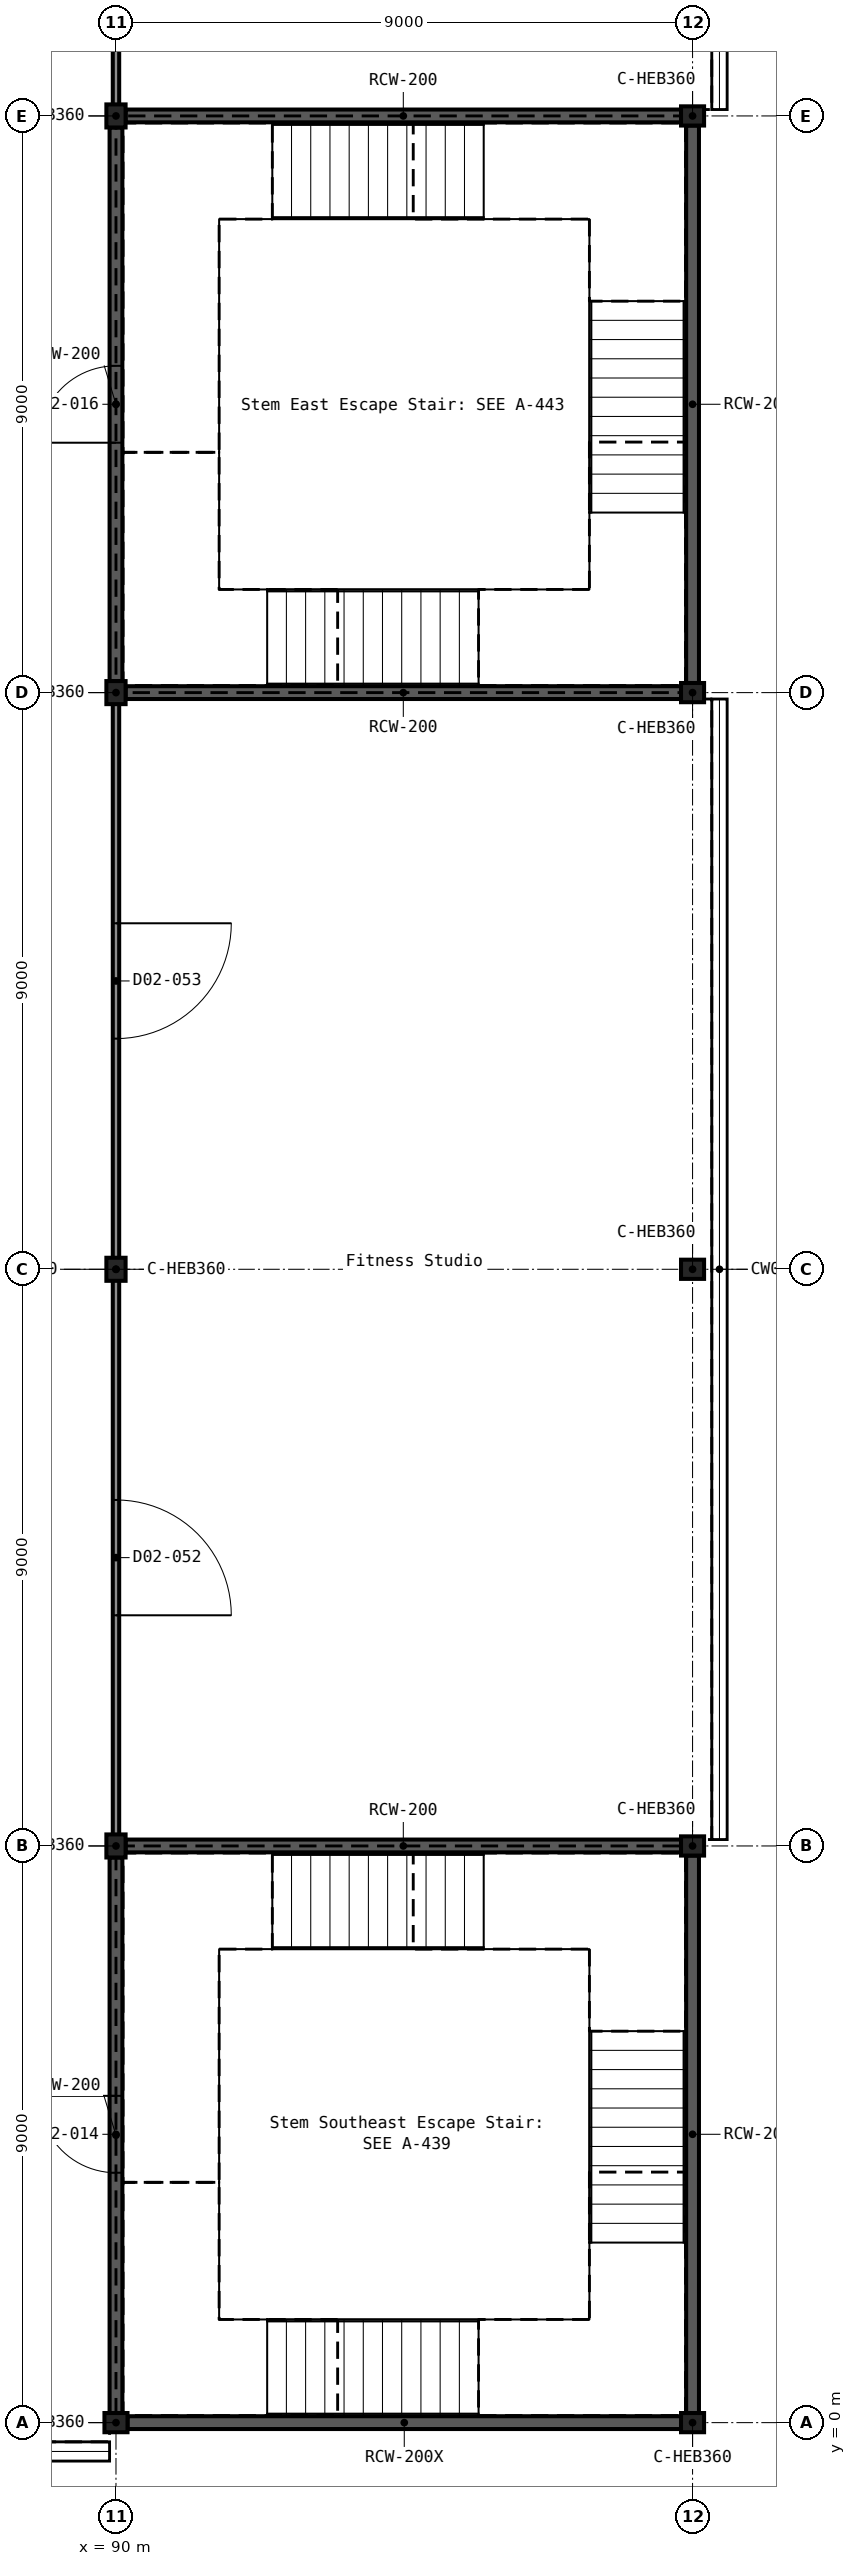
"""IFC4 building model, lengths in metres.
Left out: names, types, materials, properties, quantities, classifications, styles, units other than length and angle.
Written with IfcOpenShell. Run it as: python <this file> out.ifc"""

import sys

from ifc_helpers import new_model, si_unit, direction, frame, frame_2d, origin, origin_2d, place, context, subcontext, project, spatial, rectangle, i_section, extrude, element, fill, save


model = new_model("IFC4")
c1 = context("Model", 3, precision=1e-05, world=origin(), true_north=direction((0.0, 1.0)))
c2 = subcontext(c1, "Body", "Model", "MODEL_VIEW")
j1 = project(units=[si_unit("LENGTHUNIT", "METRE"), si_unit("PLANEANGLEUNIT", "RADIAN")], contexts=[c1])
p1 = place(None, origin())
s1 = spatial("IfcSite", under=j1, at=p1, CompositionType="ELEMENT")
p2 = place(p1, origin())
s2 = spatial("IfcBuilding", under=s1, at=p2, CompositionType="ELEMENT")
p3 = place(p2, frame((0.0, 0.0, 10.8)))
s3 = spatial("IfcBuildingStorey", under=s2, at=p3, CompositionType="ELEMENT", Elevation=10.8)
for number, where, z_axis, x_axis in (
    (1, (90.0, 0.0, 0.0), (0.0, 0.0, 1.0), (0.0, 1.0, 0.0)),
    (2, (99.0, 0.0, 0.0), (0.0, 0.0, 1.0), (0.0, 1.0, 0.0)),
    (3, (90.0, 9.0, 0.0), (0.0, 0.0, 1.0), (1.0, 0.0, 0.0)),
    (4, (99.0, 9.0, 0.0), (0.0, 0.0, 1.0), (0.0, 1.0, 0.0)),
    (5, (90.0, 18.0, 0.0), (0.0, 0.0, 1.0), (1.0, 0.0, 0.0)),
    (6, (99.0, 18.0, 0.0), (0.0, 0.0, 1.0), (0.0, 1.0, 0.0)),
    (7, (90.0, 27.0, 0.0), (0.0, 0.0, 1.0), (1.0, 0.0, 0.0)),
    (8, (99.0, 27.0, 0.0), (0.0, 0.0, 1.0), (0.0, 1.0, 0.0)),
    (9, (90.0, 36.0, 0.0), (0.0, 0.0, 1.0), (1.0, 0.0, 0.0)),
    (10, (99.0, 36.0, 0.0), (0.0, 0.0, 1.0), (0.0, 1.0, 0.0)),
):
    element("IfcColumn", number, at=place(p3, frame(where, z_axis=z_axis, x_axis=x_axis)), inside=s3, PredefinedType="COLUMN", context=c2, shape_type="SweptSolid", body=[
        extrude(i_section(OverallWidth=0.3, OverallDepth=0.36, WebThickness=0.012, FlangeThickness=0.022, FilletRadius=0.027, at=origin_2d()), origin(), (0.0, 0.0, 1.0), 5.4),
    ])
p4 = place(p3, frame((90.18, 0.0, 0.0), z_axis=(0.0, 0.0, 1.0), x_axis=(1.0, 0.0, 0.0)))
e11 = element("IfcWall", 11, at=p4, inside=s3, PredefinedType="SHEAR", context=c2, shape_type="SweptSolid", body=[
    extrude(rectangle(XDim=8.64, YDim=0.2, at=frame_2d((4.32, 0.0))), origin(), (0.0, 0.0, 1.0), 5.4),
])
p5 = place(p3, frame((90.15, 9.0, 0.0), z_axis=(0.0, 0.0, 1.0), x_axis=(1.0, 0.0, 0.0)))
e12 = element("IfcWall", 12, at=p5, inside=s3, PredefinedType="SHEAR", context=c2, shape_type="SweptSolid", body=[
    extrude(rectangle(XDim=8.67, YDim=0.2, at=frame_2d((4.335, 0.0))), origin(), (0.0, 0.0, 1.0), 5.4),
])
p6 = place(p3, frame((90.0, 0.15, 0.0), z_axis=(0.0, 0.0, 1.0), x_axis=(0.0, 1.0, 0.0)))
e13 = element("IfcWall", 13, at=p6, inside=s3, PredefinedType="SHEAR", context=c2, shape_type="SweptSolid", body=[
    extrude(rectangle(XDim=8.67, YDim=0.2, at=frame_2d((4.335, 0.0))), origin(), (0.0, 0.0, 1.0), 5.4),
])
p7 = place(p6, frame((3.75, 0.0, 0.0)))
e14 = element("IfcOpeningElement", 14, at=p7, cuts=e13, PredefinedType="OPENING", context=c2, shape_type="SweptSolid", body=[
    extrude(rectangle(XDim=1.2, YDim=2.1, at=frame_2d((0.6, 1.05))), frame((0.0, 0.111, 0.0), z_axis=(0.0, -1.0, 0.0), x_axis=(1.0, 0.0, 0.0)), (0.0, 0.0, 1.0), 0.222),
])
p8 = place(p3, frame((99.0, 0.15, 0.0), z_axis=(0.0, 0.0, 1.0), x_axis=(0.0, 1.0, 0.0)))
e15 = element("IfcWall", 15, at=p8, inside=s3, PredefinedType="SHEAR", context=c2, shape_type="SweptSolid", body=[
    extrude(rectangle(XDim=8.7, YDim=0.2, at=frame_2d((4.35, 0.0))), origin(), (0.0, 0.0, 1.0), 5.4),
])
for number, where, z_axis, x_axis in (
    (16, (90.15, 27.0, 0.0), (0.0, 0.0, 1.0), (1.0, 0.0, 0.0)),
    (17, (90.15, 36.0, 0.0), (0.0, 0.0, 1.0), (1.0, 0.0, 0.0)),
):
    element("IfcWall", number, at=place(p3, frame(where, z_axis=z_axis, x_axis=x_axis)), inside=s3, PredefinedType="SHEAR", context=c2, shape_type="SweptSolid", body=[
        extrude(rectangle(XDim=8.67, YDim=0.2, at=frame_2d((4.335, 0.0))), origin(), (0.0, 0.0, 1.0), 5.4),
    ])
p9 = place(p3, frame((90.0, 27.18, 0.0), z_axis=(0.0, 0.0, 1.0), x_axis=(0.0, 1.0, 0.0)))
e18 = element("IfcWall", 18, at=p9, inside=s3, PredefinedType="SHEAR", context=c2, shape_type="SweptSolid", body=[
    extrude(rectangle(XDim=8.64, YDim=0.2, at=frame_2d((4.32, 0.0))), origin(), (0.0, 0.0, 1.0), 5.4),
])
p10 = place(p9, frame((3.72, 0.0, 0.0)))
e19 = element("IfcOpeningElement", 19, at=p10, cuts=e18, PredefinedType="OPENING", context=c2, shape_type="SweptSolid", body=[
    extrude(rectangle(XDim=1.2, YDim=2.1, at=frame_2d((0.6, 1.05))), frame((0.0, 0.111, 0.0), z_axis=(0.0, -1.0, 0.0), x_axis=(1.0, 0.0, 0.0)), (0.0, 0.0, 1.0), 0.222),
])
p11 = place(p3, frame((99.0, 27.15, 0.0), z_axis=(0.0, 0.0, 1.0), x_axis=(0.0, 1.0, 0.0)))
e20 = element("IfcWall", 20, at=p11, inside=s3, PredefinedType="SHEAR", context=c2, shape_type="SweptSolid", body=[
    extrude(rectangle(XDim=8.7, YDim=0.2, at=frame_2d((4.35, 0.0))), origin(), (0.0, 0.0, 1.0), 5.4),
])
p12 = place(p3, frame((90.0, 9.0, 0.0), z_axis=(0.0, 0.0, 1.0), x_axis=(0.0, 1.0, 0.0)))
e21 = element("IfcWall", 21, at=p12, inside=s3, PredefinedType="PARTITIONING", context=c2, shape_type="SweptSolid", body=[
    extrude(rectangle(XDim=18.0, YDim=0.1, at=frame_2d((9.0, 0.0))), origin(), (0.0, 0.0, 1.0), 4.85),
])
p13 = place(p12, frame((3.6, 0.0, 0.0)))
e22 = element("IfcOpeningElement", 22, at=p13, cuts=e21, PredefinedType="OPENING", context=c2, shape_type="SweptSolid", body=[
    extrude(rectangle(XDim=1.8, YDim=2.1, at=frame_2d((0.9, 1.05))), frame((0.0, 0.061, 0.0), z_axis=(0.0, -1.0, 0.0), x_axis=(1.0, 0.0, 0.0)), (0.0, 0.0, 1.0), 0.122),
])
p14 = place(p12, frame((12.6, 0.0, 0.0)))
e23 = element("IfcOpeningElement", 23, at=p14, cuts=e21, PredefinedType="OPENING", context=c2, shape_type="SweptSolid", body=[
    extrude(rectangle(XDim=1.8, YDim=2.1, at=frame_2d((0.9, 1.05))), frame((0.0, 0.061, 0.0), z_axis=(0.0, -1.0, 0.0), x_axis=(1.0, 0.0, 0.0)), (0.0, 0.0, 1.0), 0.122),
])
p15 = place(p3, frame((90.0, 36.0, 0.0), z_axis=(0.0, 0.0, 1.0), x_axis=(0.0, 1.0, 0.0)))
e24 = element("IfcWall", 24, at=p15, inside=s3, PredefinedType="PARTITIONING", context=c2, shape_type="SweptSolid", body=[
    extrude(rectangle(XDim=9.0, YDim=0.1, at=frame_2d((4.5, 0.0))), origin(), (0.0, 0.0, 1.0), 4.85),
])
p16 = place(p15, frame((3.6, 0.0, 0.0)))
e25 = element("IfcOpeningElement", 25, at=p16, cuts=e24, PredefinedType="OPENING", context=c2, shape_type="SweptSolid", body=[
    extrude(rectangle(XDim=1.8, YDim=2.1, at=frame_2d((0.9, 1.05))), frame((0.0, 0.061, 0.0), z_axis=(0.0, -1.0, 0.0), x_axis=(1.0, 0.0, 0.0)), (0.0, 0.0, 1.0), 0.122),
])
p17 = place(p7, origin())
e26 = element("IfcDoor", 26, at=p17, inside=s3, OperationType="SINGLE_SWING_RIGHT", PredefinedType="DOOR", context=c2, shape_type="SweptSolid", body=[
    extrude(rectangle(XDim=1.2, YDim=2.1, at=frame_2d((0.6, 1.05))), frame((0.0, 0.025, 0.0), z_axis=(0.0, -1.0, 0.0), x_axis=(1.0, 0.0, 0.0)), (0.0, 0.0, 1.0), 0.05),
])
fill(e14, e26)
p18 = place(p10, origin())
e27 = element("IfcDoor", 27, at=p18, inside=s3, OperationType="SINGLE_SWING_LEFT", PredefinedType="DOOR", context=c2, shape_type="SweptSolid", body=[
    extrude(rectangle(XDim=1.2, YDim=2.1, at=frame_2d((0.6, 1.05))), frame((0.0, 0.025, 0.0), z_axis=(0.0, -1.0, 0.0), x_axis=(1.0, 0.0, 0.0)), (0.0, 0.0, 1.0), 0.05),
])
fill(e19, e27)
p19 = place(p13, frame((1.8, 0.0, 0.0), z_axis=(0.0, 0.0, 1.0), x_axis=(-1.0, 0.0, 0.0)))
e28 = element("IfcDoor", 28, at=p19, inside=s3, OperationType="DOUBLE_DOOR_SINGLE_SWING", PredefinedType="DOOR", context=c2, shape_type="SweptSolid", body=[
    extrude(rectangle(XDim=1.8, YDim=2.1, at=frame_2d((0.9, 1.05))), frame((0.0, 0.025, 0.0), z_axis=(0.0, -1.0, 0.0), x_axis=(1.0, 0.0, 0.0)), (0.0, 0.0, 1.0), 0.05),
])
fill(e22, e28)
p20 = place(p14, frame((1.8, 0.0, 0.0), z_axis=(0.0, 0.0, 1.0), x_axis=(-1.0, 0.0, 0.0)))
e29 = element("IfcDoor", 29, at=p20, inside=s3, OperationType="DOUBLE_DOOR_SINGLE_SWING", PredefinedType="DOOR", context=c2, shape_type="SweptSolid", body=[
    extrude(rectangle(XDim=1.8, YDim=2.1, at=frame_2d((0.9, 1.05))), frame((0.0, 0.025, 0.0), z_axis=(0.0, -1.0, 0.0), x_axis=(1.0, 0.0, 0.0)), (0.0, 0.0, 1.0), 0.05),
])
fill(e23, e29)
save(model, sys.argv[1])
